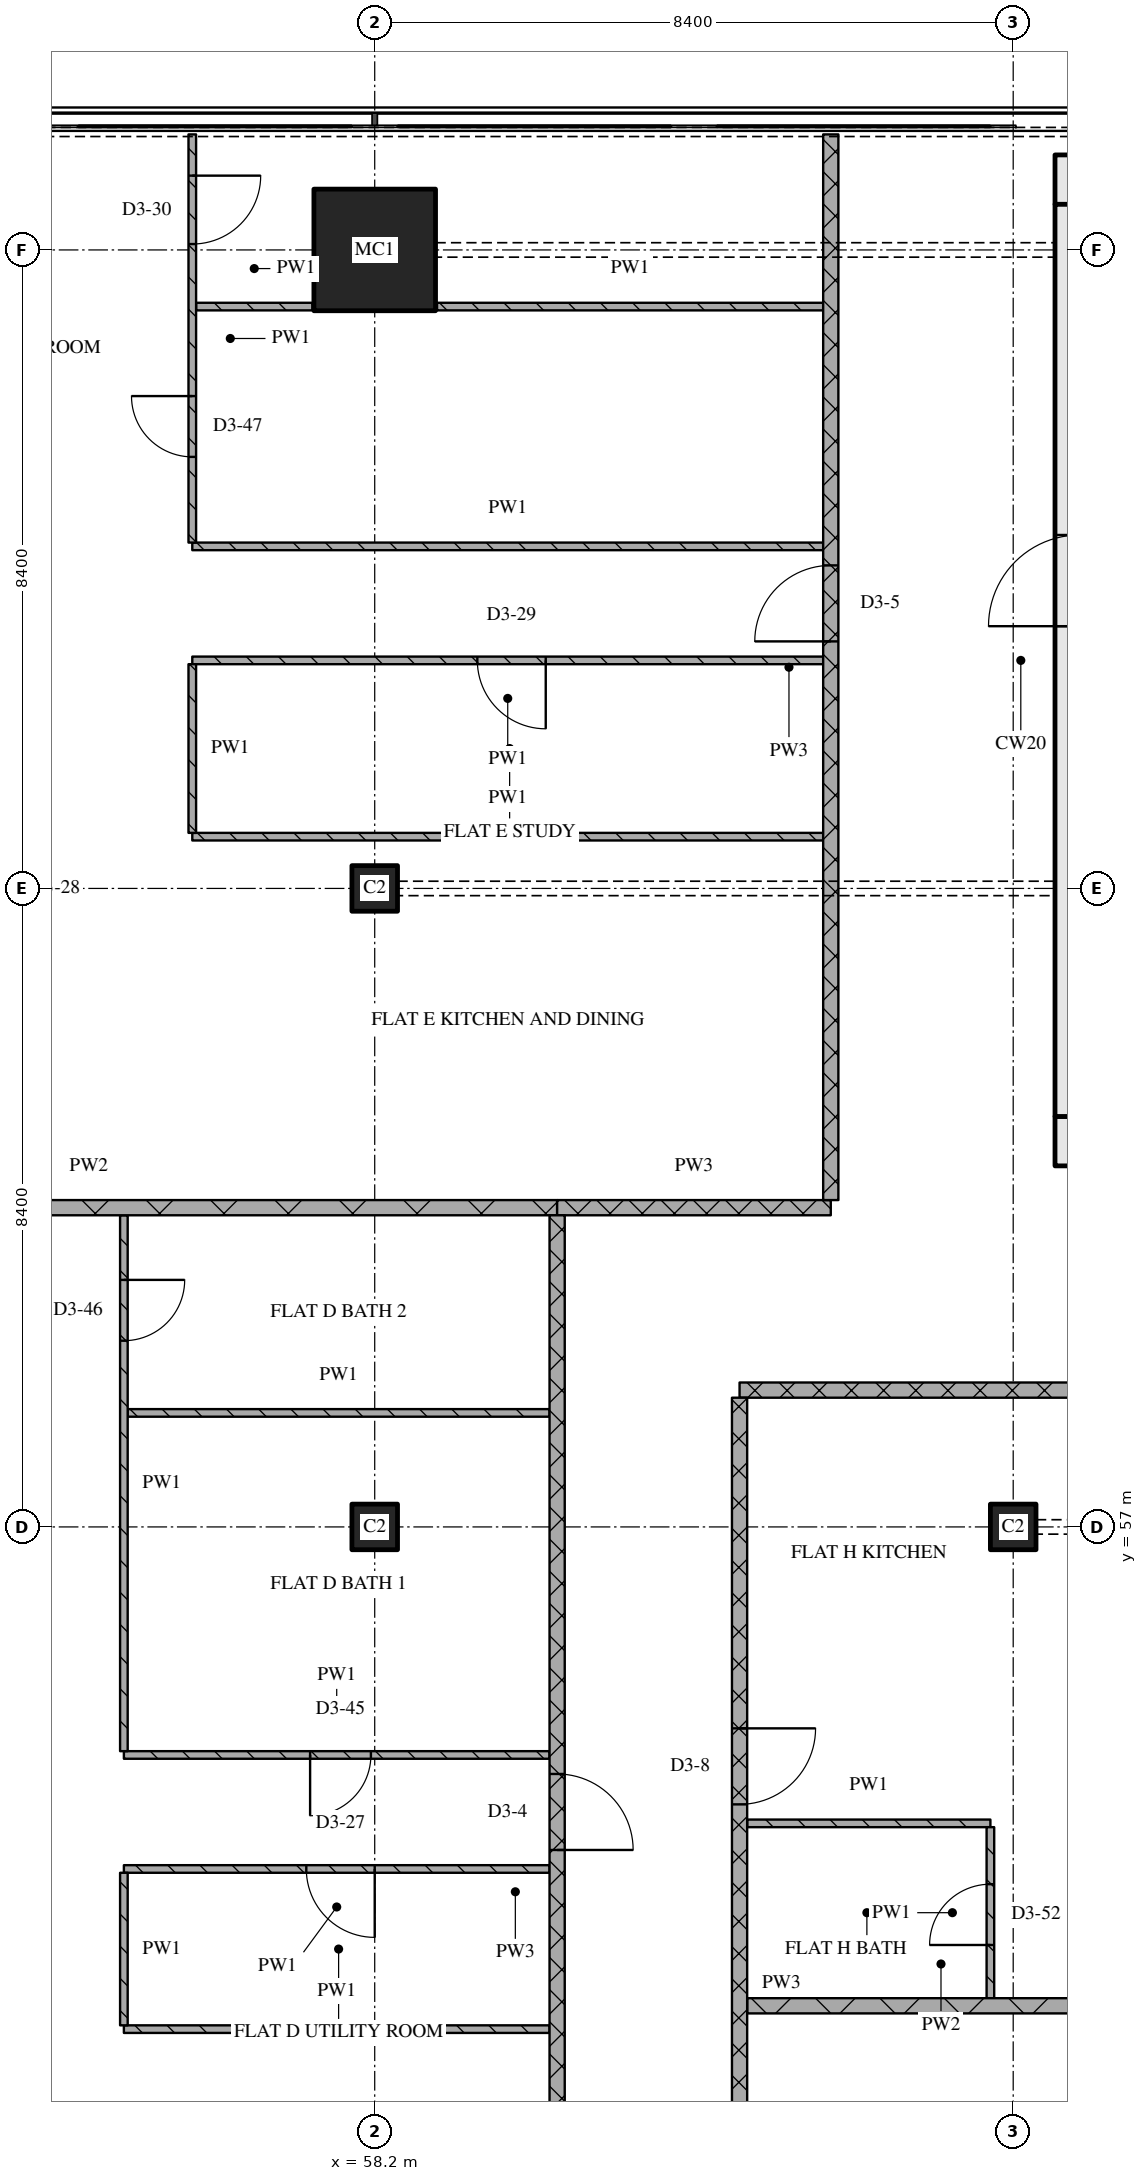
"""IFC4 building model, lengths in metres.
Left out: names, types, materials, properties, quantities, classifications, styles, units other than length and angle.
Written with IfcOpenShell. Run it as: python <this file> out.ifc"""

import sys

from ifc_helpers import new_model, si_unit, direction, frame, frame_2d, origin, origin_2d, place, context, subcontext, project, spatial, rectangle, extrude, element, fill, save


model = new_model("IFC4")
c1 = context("Model", 3, precision=1e-05, world=origin(), true_north=direction((0.0, 1.0)))
c2 = subcontext(c1, "Body", "Model", "MODEL_VIEW")
j1 = project(units=[si_unit("LENGTHUNIT", "METRE"), si_unit("PLANEANGLEUNIT", "RADIAN")], contexts=[c1])
p1 = place(None, origin())
s1 = spatial("IfcSite", under=j1, at=p1, CompositionType="ELEMENT")
p2 = place(p1, origin())
s2 = spatial("IfcBuilding", under=s1, at=p2, CompositionType="ELEMENT")
p3 = place(p2, frame((0.0, 0.0, 227.1)))
s3 = spatial("IfcBuildingStorey", under=s2, at=p3, CompositionType="ELEMENT", Elevation=227.1)
for number, where, z_axis, x_axis in (
    (1, (58.2, 57.0, 0.0), (0.0, 0.0, 1.0), (1.0, 0.0, 0.0)),
    (2, (58.2, 65.4, 0.0), (0.0, 0.0, 1.0), (1.0, 0.0, 0.0)),
):
    element("IfcColumn", number, at=place(p3, frame(where, z_axis=z_axis, x_axis=x_axis)), inside=s3, PredefinedType="COLUMN", context=c2, shape_type="SweptSolid", body=[
        extrude(rectangle(XDim=0.6, YDim=0.6, at=origin_2d()), origin(), (0.0, 0.0, 1.0), 3.6),
    ])
p4 = place(p3, frame((58.2, 73.8, 0.0), z_axis=(0.0, 0.0, 1.0), x_axis=(1.0, 0.0, 0.0)))
e3 = element("IfcColumn", 3, at=p4, inside=s3, PredefinedType="COLUMN", context=c2, shape_type="SweptSolid", body=[
    extrude(rectangle(XDim=1.6, YDim=1.6, at=origin_2d()), origin(), (0.0, 0.0, 1.0), 3.6),
])
p5 = place(p3, frame((66.6, 57.0, 0.0), z_axis=(0.0, 0.0, 1.0), x_axis=(1.0, 0.0, 0.0)))
e4 = element("IfcColumn", 4, at=p5, inside=s3, PredefinedType="COLUMN", context=c2, shape_type="SweptSolid", body=[
    extrude(rectangle(XDim=0.6, YDim=0.6, at=origin_2d()), origin(), (0.0, 0.0, 1.0), 3.6),
])
p6 = place(p3, frame((67.15, 62.075, 0.0), z_axis=(0.0, 0.0, 1.0), x_axis=(1.0, 0.0, 0.0)))
e5 = element("IfcWall", 5, at=p6, inside=s3, PredefinedType="SOLIDWALL", context=c2, shape_type="SweptSolid", body=[
    extrude(rectangle(XDim=40.9, YDim=0.65, at=frame_2d((20.45, 0.0))), origin(), (0.0, 0.0, 1.0), 3.32),
])
p7 = place(p6, frame((20.8, 0.0, 0.0)))
e6 = element("IfcOpeningElement", 6, at=p7, cuts=e5, PredefinedType="OPENING", context=c2, shape_type="SweptSolid", body=[
    extrude(rectangle(XDim=1.8, YDim=2.1, at=frame_2d((0.9, 1.05))), frame((0.0, 0.335, 0.0), z_axis=(0.0, -1.0, 0.0), x_axis=(1.0, 0.0, 0.0)), (0.0, 0.0, 1.0), 0.67),
])
p8 = place(p3, frame((67.15, 74.725, 0.0), z_axis=(0.0, 0.0, 1.0), x_axis=(1.0, 0.0, 0.0)))
e7 = element("IfcWall", 7, at=p8, inside=s3, PredefinedType="SOLIDWALL", context=c2, shape_type="SweptSolid", body=[
    extrude(rectangle(XDim=40.9, YDim=0.65, at=frame_2d((20.45, 0.0))), origin(), (0.0, 0.0, 1.0), 3.32),
])
p9 = place(p3, frame((67.475, 62.4, 0.0), z_axis=(0.0, 0.0, 1.0), x_axis=(0.0, 1.0, 0.0)))
e8 = element("IfcWall", 8, at=p9, inside=s3, PredefinedType="SOLIDWALL", context=c2, shape_type="SweptSolid", body=[
    extrude(rectangle(XDim=12.0, YDim=0.65, at=frame_2d((6.0, 0.0))), origin(), (0.0, 0.0, 1.0), 3.32),
])
p10 = place(p9, frame((6.45, 0.0, 0.0)))
e9 = element("IfcOpeningElement", 9, at=p10, cuts=e8, PredefinedType="OPENING", context=c2, shape_type="SweptSolid", body=[
    extrude(rectangle(XDim=1.2, YDim=2.1, at=frame_2d((0.6, 1.05))), frame((0.0, 0.335, 0.0), z_axis=(0.0, -1.0, 0.0), x_axis=(1.0, 0.0, 0.0)), (0.0, 0.0, 1.0), 0.67),
])
p11 = place(p3, frame((54.9, 50.393, 0.0), z_axis=(0.0, 0.0, 1.0), x_axis=(1.0, 0.0, 0.0)))
e10 = element("IfcWall", 10, at=p11, inside=s3, PredefinedType="PARTITIONING", context=c2, shape_type="SweptSolid", body=[
    extrude(rectangle(XDim=5.6, YDim=0.1, at=frame_2d((2.8, 0.0))), origin(), (0.0, 0.0, 1.0), 3.32),
])
p12 = place(p3, frame((63.1, 50.7, 0.0), z_axis=(0.0, 0.0, 1.0), x_axis=(1.0, 0.0, 0.0)))
e11 = element("IfcWall", 11, at=p12, inside=s3, PredefinedType="PARTITIONING", context=c2, shape_type="SweptSolid", body=[
    extrude(rectangle(XDim=5.1, YDim=0.2, at=frame_2d((2.55, 0.0))), origin(), (0.0, 0.0, 1.0), 3.32),
])
p13 = place(p3, frame((60.5, 52.5, 0.0), z_axis=(0.0, 0.0, 1.0), x_axis=(-1.0, 0.0, 0.0)))
e12 = element("IfcWall", 12, at=p13, inside=s3, PredefinedType="PARTITIONING", context=c2, shape_type="SweptSolid", body=[
    extrude(rectangle(XDim=5.6, YDim=0.1, at=frame_2d((2.8, 0.0))), origin(), (0.0, 0.0, 1.0), 3.32),
])
p14 = place(p13, frame((2.3, 0.0, 0.0)))
e13 = element("IfcOpeningElement", 13, at=p14, cuts=e12, PredefinedType="OPENING", context=c2, shape_type="SweptSolid", body=[
    extrude(rectangle(XDim=0.9, YDim=2.1, at=frame_2d((0.45, 1.05))), frame((0.0, 0.06, 0.0), z_axis=(0.0, -1.0, 0.0), x_axis=(1.0, 0.0, 0.0)), (0.0, 0.0, 1.0), 0.12),
])
p15 = place(p3, frame((63.1, 53.1, 0.0), z_axis=(0.0, 0.0, 1.0), x_axis=(1.0, 0.0, 0.0)))
e14 = element("IfcWall", 14, at=p15, inside=s3, PredefinedType="PARTITIONING", context=c2, shape_type="SweptSolid", body=[
    extrude(rectangle(XDim=3.2, YDim=0.1, at=frame_2d((1.6, 0.0))), origin(), (0.0, 0.0, 1.0), 3.32),
])
p16 = place(p3, frame((54.9, 54.0, 0.0), z_axis=(0.0, 0.0, 1.0), x_axis=(1.0, 0.0, 0.0)))
e15 = element("IfcWall", 15, at=p16, inside=s3, PredefinedType="PARTITIONING", context=c2, shape_type="SweptSolid", body=[
    extrude(rectangle(XDim=5.6, YDim=0.1, at=frame_2d((2.8, 0.0))), origin(), (0.0, 0.0, 1.0), 3.32),
])
p17 = place(p16, frame((2.45, 0.0, 0.0)))
e16 = element("IfcOpeningElement", 16, at=p17, cuts=e15, PredefinedType="OPENING", context=c2, shape_type="SweptSolid", body=[
    extrude(rectangle(XDim=0.8, YDim=2.1, at=frame_2d((0.4, 1.05))), frame((0.0, 0.06, 0.0), z_axis=(0.0, -1.0, 0.0), x_axis=(1.0, 0.0, 0.0)), (0.0, 0.0, 1.0), 0.12),
])
p18 = place(p3, frame((54.95, 58.5, 0.0), z_axis=(0.0, 0.0, 1.0), x_axis=(1.0, 0.0, 0.0)))
e17 = element("IfcWall", 17, at=p18, inside=s3, PredefinedType="PARTITIONING", context=c2, shape_type="SweptSolid", body=[
    extrude(rectangle(XDim=5.55, YDim=0.1, at=frame_2d((2.775, 0.0))), origin(), (0.0, 0.0, 1.0), 3.32),
])
p19 = place(p3, frame((63.0, 58.8, 0.0), z_axis=(0.0, 0.0, 1.0), x_axis=(1.0, 0.0, 0.0)))
e18 = element("IfcWall", 18, at=p19, inside=s3, PredefinedType="PARTITIONING", context=c2, shape_type="SweptSolid", body=[
    extrude(rectangle(XDim=10.8, YDim=0.2, at=frame_2d((5.4, 0.0))), origin(), (0.0, 0.0, 1.0), 3.32),
])
p20 = place(p3, frame((60.6, 61.2, 0.0), z_axis=(0.0, 0.0, 1.0), x_axis=(1.0, 0.0, 0.0)))
e19 = element("IfcWall", 19, at=p20, inside=s3, PredefinedType="PARTITIONING", context=c2, shape_type="SweptSolid", body=[
    extrude(rectangle(XDim=3.6, YDim=0.2, at=frame_2d((1.8, 0.0))), origin(), (0.0, 0.0, 1.0), 3.32),
])
p21 = place(p3, frame((48.28, 61.2, 0.0), z_axis=(0.0, 0.0, 1.0), x_axis=(1.0, 0.0, 0.0)))
e20 = element("IfcWall", 20, at=p21, inside=s3, PredefinedType="PARTITIONING", context=c2, shape_type="SweptSolid", body=[
    extrude(rectangle(XDim=12.32, YDim=0.2, at=frame_2d((6.16, 0.0))), origin(), (0.0, 0.0, 1.0), 3.32),
])
p22 = place(p3, frame((55.8, 66.081, 0.0), z_axis=(0.0, 0.0, 1.0), x_axis=(1.0, 0.0, 0.0)))
e21 = element("IfcWall", 21, at=p22, inside=s3, PredefinedType="PARTITIONING", context=c2, shape_type="SweptSolid", body=[
    extrude(rectangle(XDim=8.3, YDim=0.1, at=frame_2d((4.15, 0.0))), origin(), (0.0, 0.0, 1.0), 3.32),
])
p23 = place(p3, frame((64.1, 68.4, 0.0), z_axis=(0.0, 0.0, 1.0), x_axis=(-1.0, 0.0, 0.0)))
e22 = element("IfcWall", 22, at=p23, inside=s3, PredefinedType="PARTITIONING", context=c2, shape_type="SweptSolid", body=[
    extrude(rectangle(XDim=8.3, YDim=0.1, at=frame_2d((4.15, 0.0))), origin(), (0.0, 0.0, 1.0), 3.32),
])
p24 = place(p23, frame((3.65, 0.0, 0.0)))
e23 = element("IfcOpeningElement", 23, at=p24, cuts=e22, PredefinedType="OPENING", context=c2, shape_type="SweptSolid", body=[
    extrude(rectangle(XDim=0.9, YDim=2.1, at=frame_2d((0.45, 1.05))), frame((0.0, 0.06, 0.0), z_axis=(0.0, -1.0, 0.0), x_axis=(1.0, 0.0, 0.0)), (0.0, 0.0, 1.0), 0.12),
])
p25 = place(p3, frame((55.8, 69.9, 0.0), z_axis=(0.0, 0.0, 1.0), x_axis=(1.0, 0.0, 0.0)))
e24 = element("IfcWall", 24, at=p25, inside=s3, PredefinedType="PARTITIONING", context=c2, shape_type="SweptSolid", body=[
    extrude(rectangle(XDim=8.3, YDim=0.1, at=frame_2d((4.15, 0.0))), origin(), (0.0, 0.0, 1.0), 3.32),
])
p26 = place(p3, frame((55.85, 73.055, 0.0), z_axis=(0.0, 0.0, 1.0), x_axis=(1.0, 0.0, 0.0)))
e25 = element("IfcWall", 25, at=p26, inside=s3, PredefinedType="PARTITIONING", context=c2, shape_type="SweptSolid", body=[
    extrude(rectangle(XDim=1.53, YDim=0.1, at=frame_2d((0.765, 0.0))), origin(), (0.0, 0.0, 1.0), 3.32),
])
p27 = place(p3, frame((59.02, 73.055, 0.0), z_axis=(0.0, 0.0, 1.0), x_axis=(1.0, 0.0, 0.0)))
e26 = element("IfcWall", 26, at=p27, inside=s3, PredefinedType="PARTITIONING", context=c2, shape_type="SweptSolid", body=[
    extrude(rectangle(XDim=5.08, YDim=0.1, at=frame_2d((2.54, 0.0))), origin(), (0.0, 0.0, 1.0), 3.32),
])
p28 = place(p3, frame((54.9, 52.45, 0.0), z_axis=(0.0, 0.0, 1.0), x_axis=(0.0, -1.0, 0.0)))
e27 = element("IfcWall", 27, at=p28, inside=s3, PredefinedType="PARTITIONING", context=c2, shape_type="SweptSolid", body=[
    extrude(rectangle(XDim=2.007, YDim=0.1, at=frame_2d((1.003, 0.0))), origin(), (0.0, 0.0, 1.0), 3.32),
])
p29 = place(p3, frame((54.9, 61.1, 0.0), z_axis=(0.0, 0.0, 1.0), x_axis=(0.0, -1.0, 0.0)))
e28 = element("IfcWall", 28, at=p29, inside=s3, PredefinedType="PARTITIONING", context=c2, shape_type="SweptSolid", body=[
    extrude(rectangle(XDim=7.05, YDim=0.1, at=frame_2d((3.525, 0.0))), origin(), (0.0, 0.0, 1.0), 3.32),
])
p30 = place(p29, frame((0.85, 0.0, 0.0)))
e29 = element("IfcOpeningElement", 29, at=p30, cuts=e28, PredefinedType="OPENING", context=c2, shape_type="SweptSolid", body=[
    extrude(rectangle(XDim=0.8, YDim=2.1, at=frame_2d((0.4, 1.05))), frame((0.0, 0.06, 0.0), z_axis=(0.0, -1.0, 0.0), x_axis=(1.0, 0.0, 0.0)), (0.0, 0.0, 1.0), 0.12),
])
p31 = place(p3, frame((55.8, 68.35, 0.0), z_axis=(0.0, 0.0, 1.0), x_axis=(0.0, -1.0, 0.0)))
e30 = element("IfcWall", 30, at=p31, inside=s3, PredefinedType="PARTITIONING", context=c2, shape_type="SweptSolid", body=[
    extrude(rectangle(XDim=2.219, YDim=0.1, at=frame_2d((1.109, 0.0))), origin(), (0.0, 0.0, 1.0), 3.32),
])
p32 = place(p3, frame((55.8, 75.32, 0.0), z_axis=(0.0, 0.0, 1.0), x_axis=(0.0, -1.0, 0.0)))
e31 = element("IfcWall", 31, at=p32, inside=s3, PredefinedType="PARTITIONING", context=c2, shape_type="SweptSolid", body=[
    extrude(rectangle(XDim=5.37, YDim=0.1, at=frame_2d((2.685, 0.0))), origin(), (0.0, 0.0, 1.0), 3.32),
])
p33 = place(p32, frame((0.542, 0.0, 0.0)))
e32 = element("IfcOpeningElement", 32, at=p33, cuts=e31, PredefinedType="OPENING", context=c2, shape_type="SweptSolid", body=[
    extrude(rectangle(XDim=0.9, YDim=2.1, at=frame_2d((0.45, 1.05))), frame((0.0, 0.06, 0.0), z_axis=(0.0, -1.0, 0.0), x_axis=(1.0, 0.0, 0.0)), (0.0, 0.0, 1.0), 0.12),
])
p34 = place(p32, frame((3.443, 0.0, 0.0)))
e33 = element("IfcOpeningElement", 33, at=p34, cuts=e31, PredefinedType="OPENING", context=c2, shape_type="SweptSolid", body=[
    extrude(rectangle(XDim=0.8, YDim=2.1, at=frame_2d((0.4, 1.05))), frame((0.0, 0.06, 0.0), z_axis=(0.0, -1.0, 0.0), x_axis=(1.0, 0.0, 0.0)), (0.0, 0.0, 1.0), 0.12),
])
p35 = place(p3, frame((60.6, 43.3, 0.0), z_axis=(0.0, 0.0, 1.0), x_axis=(0.0, 1.0, 0.0)))
e34 = element("IfcWall", 34, at=p35, inside=s3, PredefinedType="PARTITIONING", context=c2, shape_type="SweptSolid", body=[
    extrude(rectangle(XDim=17.8, YDim=0.2, at=frame_2d((8.9, 0.0))), origin(), (0.0, 0.0, 1.0), 3.32),
])
p36 = place(p35, frame((9.45, 0.0, 0.0)))
e35 = element("IfcOpeningElement", 35, at=p36, cuts=e34, PredefinedType="OPENING", context=c2, shape_type="SweptSolid", body=[
    extrude(rectangle(XDim=1.0, YDim=2.1, at=frame_2d((0.5, 1.05))), frame((0.0, 0.11, 0.0), z_axis=(0.0, -1.0, 0.0), x_axis=(1.0, 0.0, 0.0)), (0.0, 0.0, 1.0), 0.22),
])
p37 = place(p3, frame((63.0, 58.7, 0.0), z_axis=(0.0, 0.0, 1.0), x_axis=(0.0, -1.0, 0.0)))
e36 = element("IfcWall", 36, at=p37, inside=s3, PredefinedType="PARTITIONING", context=c2, shape_type="SweptSolid", body=[
    extrude(rectangle(XDim=15.4, YDim=0.2, at=frame_2d((7.7, 0.0))), origin(), (0.0, 0.0, 1.0), 3.32),
])
p38 = place(p37, frame((4.35, 0.0, 0.0)))
e37 = element("IfcOpeningElement", 37, at=p38, cuts=e36, PredefinedType="OPENING", context=c2, shape_type="SweptSolid", body=[
    extrude(rectangle(XDim=1.0, YDim=2.1, at=frame_2d((0.5, 1.05))), frame((0.0, 0.11, 0.0), z_axis=(0.0, -1.0, 0.0), x_axis=(1.0, 0.0, 0.0)), (0.0, 0.0, 1.0), 0.22),
])
p39 = place(p37, frame((11.25, 0.0, 0.0)))
e38 = element("IfcOpeningElement", 38, at=p39, cuts=e36, PredefinedType="OPENING", context=c2, shape_type="SweptSolid", body=[
    extrude(rectangle(XDim=0.9, YDim=2.1, at=frame_2d((0.45, 1.05))), frame((0.0, 0.11, 0.0), z_axis=(0.0, -1.0, 0.0), x_axis=(1.0, 0.0, 0.0)), (0.0, 0.0, 1.0), 0.22),
])
p40 = place(p3, frame((64.2, 61.3, 0.0), z_axis=(0.0, 0.0, 1.0), x_axis=(0.0, 1.0, 0.0)))
e39 = element("IfcWall", 39, at=p40, inside=s3, PredefinedType="PARTITIONING", context=c2, shape_type="SweptSolid", body=[
    extrude(rectangle(XDim=14.02, YDim=0.2, at=frame_2d((7.01, 0.0))), origin(), (0.0, 0.0, 1.0), 3.32),
])
p41 = place(p40, frame((7.35, 0.0, 0.0)))
e40 = element("IfcOpeningElement", 40, at=p41, cuts=e39, PredefinedType="OPENING", context=c2, shape_type="SweptSolid", body=[
    extrude(rectangle(XDim=1.0, YDim=2.1, at=frame_2d((0.5, 1.05))), frame((0.0, 0.11, 0.0), z_axis=(0.0, -1.0, 0.0), x_axis=(1.0, 0.0, 0.0)), (0.0, 0.0, 1.0), 0.22),
])
p42 = place(p3, frame((66.3, 50.8, 0.0), z_axis=(0.0, 0.0, 1.0), x_axis=(0.0, 1.0, 0.0)))
e41 = element("IfcWall", 41, at=p42, inside=s3, PredefinedType="PARTITIONING", context=c2, shape_type="SweptSolid", body=[
    extrude(rectangle(XDim=2.25, YDim=0.1, at=frame_2d((1.125, 0.0))), origin(), (0.0, 0.0, 1.0), 3.32),
])
p43 = place(p42, frame((0.7, 0.0, 0.0)))
e42 = element("IfcOpeningElement", 42, at=p43, cuts=e41, PredefinedType="OPENING", context=c2, shape_type="SweptSolid", body=[
    extrude(rectangle(XDim=0.8, YDim=2.1, at=frame_2d((0.4, 1.05))), frame((0.0, 0.06, 0.0), z_axis=(0.0, -1.0, 0.0), x_axis=(1.0, 0.0, 0.0)), (0.0, 0.0, 1.0), 0.12),
])
p44 = place(p14, origin())
e43 = element("IfcDoor", 43, at=p44, inside=s3, OperationType="SINGLE_SWING_LEFT", PredefinedType="DOOR", context=c2, shape_type="SweptSolid", body=[
    extrude(rectangle(XDim=0.9, YDim=2.1, at=frame_2d((0.45, 1.05))), frame((0.0, 0.025, 0.0), z_axis=(0.0, -1.0, 0.0), x_axis=(1.0, 0.0, 0.0)), (0.0, 0.0, 1.0), 0.05),
])
fill(e13, e43)
p45 = place(p17, origin())
e44 = element("IfcDoor", 44, at=p45, inside=s3, OperationType="SINGLE_SWING_RIGHT", PredefinedType="DOOR", context=c2, shape_type="SweptSolid", body=[
    extrude(rectangle(XDim=0.8, YDim=2.1, at=frame_2d((0.4, 1.05))), frame((0.0, 0.025, 0.0), z_axis=(0.0, -1.0, 0.0), x_axis=(1.0, 0.0, 0.0)), (0.0, 0.0, 1.0), 0.05),
])
fill(e16, e44)
p46 = place(p24, origin())
e45 = element("IfcDoor", 45, at=p46, inside=s3, OperationType="SINGLE_SWING_LEFT", PredefinedType="DOOR", context=c2, shape_type="SweptSolid", body=[
    extrude(rectangle(XDim=0.9, YDim=2.1, at=frame_2d((0.45, 1.05))), frame((0.0, 0.025, 0.0), z_axis=(0.0, -1.0, 0.0), x_axis=(1.0, 0.0, 0.0)), (0.0, 0.0, 1.0), 0.05),
])
fill(e23, e45)
p47 = place(p30, origin())
e46 = element("IfcDoor", 46, at=p47, inside=s3, OperationType="SINGLE_SWING_LEFT", PredefinedType="DOOR", context=c2, shape_type="SweptSolid", body=[
    extrude(rectangle(XDim=0.8, YDim=2.1, at=frame_2d((0.4, 1.05))), frame((0.0, 0.025, 0.0), z_axis=(0.0, -1.0, 0.0), x_axis=(1.0, 0.0, 0.0)), (0.0, 0.0, 1.0), 0.05),
])
fill(e29, e46)
p48 = place(p33, origin())
e47 = element("IfcDoor", 47, at=p48, inside=s3, OperationType="SINGLE_SWING_LEFT", PredefinedType="DOOR", context=c2, shape_type="SweptSolid", body=[
    extrude(rectangle(XDim=0.9, YDim=2.1, at=frame_2d((0.45, 1.05))), frame((0.0, 0.025, 0.0), z_axis=(0.0, -1.0, 0.0), x_axis=(1.0, 0.0, 0.0)), (0.0, 0.0, 1.0), 0.05),
])
fill(e32, e47)
p49 = place(p34, origin())
e48 = element("IfcDoor", 48, at=p49, inside=s3, OperationType="SINGLE_SWING_RIGHT", PredefinedType="DOOR", context=c2, shape_type="SweptSolid", body=[
    extrude(rectangle(XDim=0.8, YDim=2.1, at=frame_2d((0.4, 1.05))), frame((0.0, 0.025, 0.0), z_axis=(0.0, -1.0, 0.0), x_axis=(1.0, 0.0, 0.0)), (0.0, 0.0, 1.0), 0.05),
])
fill(e33, e48)
p50 = place(p36, origin())
e49 = element("IfcDoor", 49, at=p50, inside=s3, OperationType="SINGLE_SWING_RIGHT", PredefinedType="DOOR", context=c2, shape_type="SweptSolid", body=[
    extrude(rectangle(XDim=1.0, YDim=2.1, at=frame_2d((0.5, 1.05))), frame((0.0, 0.025, 0.0), z_axis=(0.0, -1.0, 0.0), x_axis=(1.0, 0.0, 0.0)), (0.0, 0.0, 1.0), 0.05),
])
fill(e35, e49)
p51 = place(p38, origin())
e50 = element("IfcDoor", 50, at=p51, inside=s3, OperationType="SINGLE_SWING_LEFT", PredefinedType="DOOR", context=c2, shape_type="SweptSolid", body=[
    extrude(rectangle(XDim=1.0, YDim=2.1, at=frame_2d((0.5, 1.05))), frame((0.0, 0.025, 0.0), z_axis=(0.0, -1.0, 0.0), x_axis=(1.0, 0.0, 0.0)), (0.0, 0.0, 1.0), 0.05),
])
fill(e37, e50)
p52 = place(p41, origin())
e51 = element("IfcDoor", 51, at=p52, inside=s3, OperationType="SINGLE_SWING_LEFT", PredefinedType="DOOR", context=c2, shape_type="SweptSolid", body=[
    extrude(rectangle(XDim=1.0, YDim=2.1, at=frame_2d((0.5, 1.05))), frame((0.0, 0.025, 0.0), z_axis=(0.0, -1.0, 0.0), x_axis=(1.0, 0.0, 0.0)), (0.0, 0.0, 1.0), 0.05),
])
fill(e40, e51)
p53 = place(p43, origin())
e52 = element("IfcDoor", 52, at=p53, inside=s3, OperationType="SINGLE_SWING_LEFT", PredefinedType="DOOR", context=c2, shape_type="SweptSolid", body=[
    extrude(rectangle(XDim=0.8, YDim=2.1, at=frame_2d((0.4, 1.05))), frame((0.0, 0.025, 0.0), z_axis=(0.0, -1.0, 0.0), x_axis=(1.0, 0.0, 0.0)), (0.0, 0.0, 1.0), 0.05),
])
fill(e42, e52)
save(model, sys.argv[1])
